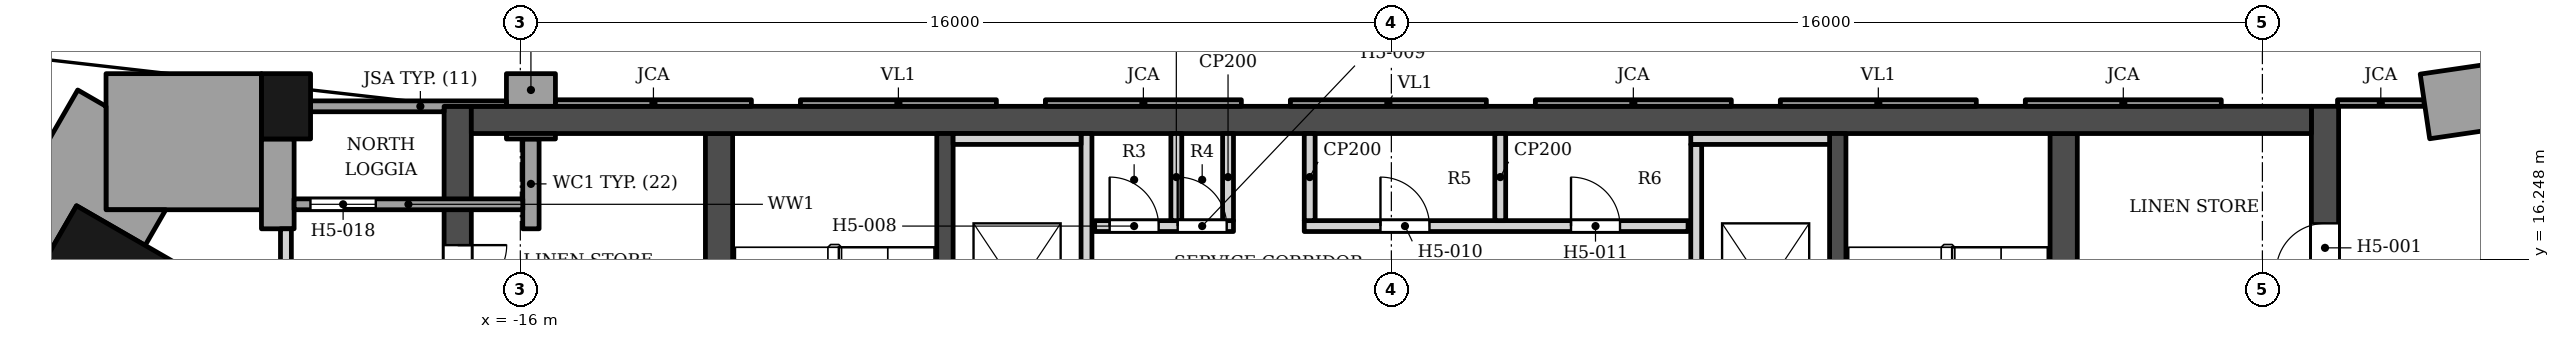
"""IFC4 building model, lengths in metres.
Left out: names, types, materials, properties, quantities, classifications, styles, units other than length and angle.
Written with IfcOpenShell. Run it as: python <this file> out.ifc"""

import sys

from ifc_helpers import new_model, si_unit, direction, frame, frame_2d, origin, origin_2d, place, context, subcontext, project, spatial, polyline, rectangle, outline, extrude, element, fill, save


model = new_model("IFC4")
c1 = context("Model", 3, precision=1e-05, world=origin(), true_north=direction((0.0, 1.0)))
c2 = subcontext(c1, "Body", "Model", "MODEL_VIEW")
j1 = project(units=[si_unit("LENGTHUNIT", "METRE"), si_unit("PLANEANGLEUNIT", "RADIAN")], contexts=[c1])
p1 = place(None, origin())
s1 = spatial("IfcSite", under=j1, at=p1, CompositionType="ELEMENT")
p2 = place(p1, origin())
s2 = spatial("IfcBuilding", under=s1, at=p2, CompositionType="ELEMENT")
p3 = place(p2, frame((0.0, 0.0, 91.8)))
s3 = spatial("IfcBuildingStorey", under=s2, at=p3, CompositionType="ELEMENT", Elevation=91.8)
p4 = place(p3, frame((-16.9, 18.802, 0.0), z_axis=(0.0, 0.0, 1.0), x_axis=(1.0, 0.0, 0.0)))
e1 = element("IfcWall", 1, at=p4, inside=s3, PredefinedType="SHEAR", context=c2, shape_type="SweptSolid", body=[
    extrude(rectangle(XDim=33.8, YDim=0.5, at=frame_2d((16.9, 0.0))), origin(), (0.0, 0.0, 1.0), 3.4),
])
p5 = place(p3, frame((-12.35, 5.253, 0.0), z_axis=(0.0, 0.0, 1.0), x_axis=(0.0, 1.0, 0.0)))
e2 = element("IfcWall", 2, at=p5, inside=s3, PredefinedType="SHEAR", context=c2, shape_type="SweptSolid", body=[
    extrude(rectangle(XDim=13.3, YDim=0.5, at=frame_2d((6.65, 0.0))), origin(), (0.0, 0.0, 1.0), 3.4),
])
p6 = place(p3, frame((-8.2, 5.253, 0.0), z_axis=(0.0, 0.0, 1.0), x_axis=(0.0, 1.0, 0.0)))
e3 = element("IfcWall", 3, at=p6, inside=s3, PredefinedType="SHEAR", context=c2, shape_type="SweptSolid", body=[
    extrude(rectangle(XDim=13.3, YDim=0.3, at=frame_2d((6.65, 0.0))), origin(), (0.0, 0.0, 1.0), 3.4),
])
p7 = place(p6, frame((7.1, 0.0, 0.0)))
e4 = element("IfcOpeningElement", 4, at=p7, cuts=e3, PredefinedType="OPENING", context=c2, shape_type="SweptSolid", body=[
    extrude(rectangle(XDim=1.4, YDim=2.1, at=frame_2d((0.7, 1.05))), frame((0.0, 0.16, 0.0), z_axis=(0.0, -1.0, 0.0), x_axis=(1.0, 0.0, 0.0)), (0.0, 0.0, 1.0), 0.32),
])
p8 = place(p6, frame((5.05, 0.0, 0.0)))
e5 = element("IfcOpeningElement", 5, at=p8, cuts=e3, PredefinedType="OPENING", context=c2, shape_type="SweptSolid", body=[
    extrude(rectangle(XDim=1.4, YDim=2.1, at=frame_2d((0.7, 1.05))), frame((0.0, 0.16, 0.0), z_axis=(0.0, -1.0, 0.0), x_axis=(1.0, 0.0, 0.0)), (0.0, 0.0, 1.0), 0.32),
])
p9 = place(p3, frame((12.35, 5.253, 0.0), z_axis=(0.0, 0.0, 1.0), x_axis=(0.0, 1.0, 0.0)))
e6 = element("IfcWall", 6, at=p9, inside=s3, PredefinedType="SHEAR", context=c2, shape_type="SweptSolid", body=[
    extrude(rectangle(XDim=13.3, YDim=0.5, at=frame_2d((6.65, 0.0))), origin(), (0.0, 0.0, 1.0), 3.4),
])
p10 = place(p3, frame((8.2, 5.253, 0.0), z_axis=(0.0, 0.0, 1.0), x_axis=(0.0, 1.0, 0.0)))
e7 = element("IfcWall", 7, at=p10, inside=s3, PredefinedType="SHEAR", context=c2, shape_type="SweptSolid", body=[
    extrude(rectangle(XDim=13.3, YDim=0.3, at=frame_2d((6.65, 0.0))), origin(), (0.0, 0.0, 1.0), 3.4),
])
p11 = place(p10, frame((7.1, 0.0, 0.0)))
e8 = element("IfcOpeningElement", 8, at=p11, cuts=e7, PredefinedType="OPENING", context=c2, shape_type="SweptSolid", body=[
    extrude(rectangle(XDim=1.4, YDim=2.1, at=frame_2d((0.7, 1.05))), frame((0.0, 0.16, 0.0), z_axis=(0.0, -1.0, 0.0), x_axis=(1.0, 0.0, 0.0)), (0.0, 0.0, 1.0), 0.32),
])
p12 = place(p10, frame((5.05, 0.0, 0.0)))
e9 = element("IfcOpeningElement", 9, at=p12, cuts=e7, PredefinedType="OPENING", context=c2, shape_type="SweptSolid", body=[
    extrude(rectangle(XDim=1.4, YDim=2.1, at=frame_2d((0.7, 1.05))), frame((0.0, 0.16, 0.0), z_axis=(0.0, -1.0, 0.0), x_axis=(1.0, 0.0, 0.0)), (0.0, 0.0, 1.0), 0.32),
])
p13 = place(p3, frame((-17.15, 5.853, 0.0), z_axis=(0.0, 0.0, 1.0), x_axis=(0.0, 1.0, 0.0)))
e10 = element("IfcWall", 10, at=p13, inside=s3, PredefinedType="SHEAR", context=c2, shape_type="SweptSolid", body=[
    extrude(rectangle(XDim=13.2, YDim=0.5, at=frame_2d((6.6, 0.0))), origin(), (0.0, 0.0, 1.0), 3.4),
])
p14 = place(p13, frame((4.1, 0.0, 0.0)))
e11 = element("IfcOpeningElement", 11, at=p14, cuts=e10, PredefinedType="OPENING", context=c2, shape_type="SweptSolid", body=[
    extrude(rectangle(XDim=1.6, YDim=2.1, at=frame_2d((0.8, 1.05))), frame((0.0, 0.26, 0.0), z_axis=(0.0, -1.0, 0.0), x_axis=(1.0, 0.0, 0.0)), (0.0, 0.0, 1.0), 0.52),
])
p15 = place(p13, frame((9.75, 0.0, 0.0)))
e12 = element("IfcOpeningElement", 12, at=p15, cuts=e10, PredefinedType="OPENING", context=c2, shape_type="SweptSolid", body=[
    extrude(rectangle(XDim=0.9, YDim=2.1, at=frame_2d((0.45, 1.05))), frame((0.0, 0.26, 0.0), z_axis=(0.0, -1.0, 0.0), x_axis=(1.0, 0.0, 0.0)), (0.0, 0.0, 1.0), 0.52),
])
p16 = place(p3, frame((17.15, 5.853, 0.0), z_axis=(0.0, 0.0, 1.0), x_axis=(0.0, 1.0, 0.0)))
e13 = element("IfcWall", 13, at=p16, inside=s3, PredefinedType="SHEAR", context=c2, shape_type="SweptSolid", body=[
    extrude(rectangle(XDim=13.2, YDim=0.5, at=frame_2d((6.6, 0.0))), origin(), (0.0, 0.0, 1.0), 3.4),
])
p17 = place(p16, frame((4.1, 0.0, 0.0)))
e14 = element("IfcOpeningElement", 14, at=p17, cuts=e13, PredefinedType="OPENING", context=c2, shape_type="SweptSolid", body=[
    extrude(rectangle(XDim=1.6, YDim=2.1, at=frame_2d((0.8, 1.05))), frame((0.0, 0.26, 0.0), z_axis=(0.0, -1.0, 0.0), x_axis=(1.0, 0.0, 0.0)), (0.0, 0.0, 1.0), 0.52),
])
p18 = place(p16, frame((10.15, 0.0, 0.0)))
e15 = element("IfcOpeningElement", 15, at=p18, cuts=e13, PredefinedType="OPENING", context=c2, shape_type="SweptSolid", body=[
    extrude(rectangle(XDim=0.9, YDim=2.1, at=frame_2d((0.45, 1.05))), frame((0.0, 0.26, 0.0), z_axis=(0.0, -1.0, 0.0), x_axis=(1.0, 0.0, 0.0)), (0.0, 0.0, 1.0), 0.52),
])
p19 = place(p3, frame((-23.603, 15.177, 0.0), z_axis=(0.0, 0.0, 1.0), x_axis=(0.866025438691, -0.49999993954, 0.0)))
e16 = element("IfcColumn", 16, at=p19, inside=s3, PredefinedType="COLUMN", context=c2, shape_type="SweptSolid", body=[
    extrude(rectangle(XDim=3.0, YDim=3.0, at=origin_2d()), origin(), (0.0, 0.0, 1.0), 3.4),
])
p20 = place(p3, frame((-20.303, 19.053, 0.0), z_axis=(0.0, 0.0, 1.0), x_axis=(-1.0, 0.0, 0.0)))
e17 = element("IfcColumn", 17, at=p20, inside=s3, PredefinedType="COLUMN", context=c2, shape_type="SweptSolid", body=[
    extrude(rectangle(XDim=0.9, YDim=1.2, at=origin_2d()), origin(), (0.0, 0.0, 1.0), 3.4),
])
p21 = place(p3, origin())
e18 = element("IfcWall", 18, at=p21, inside=s3, PredefinedType="SOLIDWALL", context=c2, shape_type="SweptSolid", body=[
    extrude(outline(polyline([(-15.355, 19.052), (-15.355, 19.653), (-16.255, 19.653), (-16.255, 19.052), (-15.355, 19.052)])), origin(), (0.0, 0.0, 1.0), 2.65),
])
p22 = place(p3, origin())
e19 = element("IfcWall", 19, at=p22, inside=s3, PredefinedType="SOLIDWALL", context=c2, shape_type="SweptSolid", body=[
    extrude(outline(polyline([(-15.355, 18.453), (-15.355, 18.552), (-16.255, 18.552), (-16.255, 18.453), (-15.355, 18.453)])), origin(), (0.0, 0.0, 1.0), 2.65),
])
p23 = place(p3, origin())
e20 = element("IfcWall", 20, at=p23, inside=s3, PredefinedType="SOLIDWALL", context=c2, shape_type="SweptSolid", body=[
    extrude(outline(polyline([(-15.655, 16.802), (-15.655, 18.453), (-15.955, 18.453), (-15.955, 16.802), (-15.655, 16.802)])), origin(), (0.0, 0.0, 1.0), 2.65),
])
p24 = place(p3, origin())
e21 = element("IfcWall", 21, at=p24, inside=s3, PredefinedType="SOLIDWALL", context=c2, shape_type="SweptSolid", body=[
    extrude(outline(polyline([(-20.755, 18.453), (-20.755, 16.802), (-20.155, 16.802), (-20.155, 18.453), (-20.755, 18.453)])), origin(), (0.0, 0.0, 1.0), 2.63),
])
p25 = place(p3, origin())
e22 = element("IfcWall", 22, at=p25, inside=s3, PredefinedType="SOLIDWALL", context=c2, shape_type="SweptSolid", body=[
    extrude(outline(polyline([(11.645, 19.173), (11.645, 19.052), (15.245, 19.052), (15.245, 19.173), (11.645, 19.173)])), origin(), (0.0, 0.0, 1.0), 2.65),
])
p26 = place(p3, origin())
e23 = element("IfcWall", 23, at=p26, inside=s3, PredefinedType="ELEMENTEDWALL", context=c2, shape_type="SweptSolid", body=[
    extrude(outline(polyline([(7.145, 19.173), (7.145, 19.052), (10.745, 19.052), (10.745, 19.173), (7.145, 19.173)])), origin(), (0.0, 0.0, 1.0), 2.65),
])
p27 = place(p3, origin())
e24 = element("IfcWall", 24, at=p27, inside=s3, PredefinedType="SOLIDWALL", context=c2, shape_type="SweptSolid", body=[
    extrude(outline(polyline([(2.645, 19.173), (2.645, 19.052), (6.245, 19.052), (6.245, 19.173), (2.645, 19.173)])), origin(), (0.0, 0.0, 1.0), 2.65),
])
p28 = place(p3, origin())
e25 = element("IfcWall", 25, at=p28, inside=s3, PredefinedType="ELEMENTEDWALL", context=c2, shape_type="SweptSolid", body=[
    extrude(outline(polyline([(-1.855, 19.173), (-1.855, 19.052), (1.745, 19.052), (1.745, 19.173), (-1.855, 19.173)])), origin(), (0.0, 0.0, 1.0), 2.65),
])
p29 = place(p3, origin())
e26 = element("IfcWall", 26, at=p29, inside=s3, PredefinedType="SOLIDWALL", context=c2, shape_type="SweptSolid", body=[
    extrude(outline(polyline([(-6.355, 19.173), (-6.355, 19.052), (-2.755, 19.052), (-2.755, 19.173), (-6.355, 19.173)])), origin(), (0.0, 0.0, 1.0), 2.65),
])
p30 = place(p3, origin())
e27 = element("IfcWall", 27, at=p30, inside=s3, PredefinedType="ELEMENTEDWALL", context=c2, shape_type="SweptSolid", body=[
    extrude(outline(polyline([(-10.855, 19.173), (-10.855, 19.052), (-7.255, 19.052), (-7.255, 19.173), (-10.855, 19.173)])), origin(), (0.0, 0.0, 1.0), 2.65),
])
p31 = place(p3, origin())
e28 = element("IfcWall", 28, at=p31, inside=s3, PredefinedType="SOLIDWALL", context=c2, shape_type="SweptSolid", body=[
    extrude(outline(polyline([(-15.354, 19.173), (-15.354, 19.052), (-11.755, 19.052), (-11.755, 19.173), (-15.354, 19.173)])), origin(), (0.0, 0.0, 1.0), 2.65),
])
p32 = place(p3, origin())
e29 = element("IfcWall", 29, at=p32, inside=s3, PredefinedType="SOLIDWALL", context=c2, shape_type="SweptSolid", body=[
    extrude(outline(polyline([(-16.255, 19.052), (-16.255, 19.153), (-19.853, 19.153), (-19.853, 18.953), (-17.4, 18.953), (-17.4, 19.052), (-16.255, 19.052)])), origin(), (0.0, 0.0, 1.0), 2.65),
])
p33 = place(p3, frame((-15.955, 17.252, 0.0), z_axis=(0.0, 0.0, 1.0), x_axis=(-1.0, 0.0, 0.0)))
e30 = element("IfcWall", 30, at=p33, inside=s3, PredefinedType="ELEMENTEDWALL", context=c2, shape_type="SweptSolid", body=[
    extrude(rectangle(XDim=4.2, YDim=0.2, at=frame_2d((2.1, 0.0))), origin(), (0.0, 0.0, 1.0), 2.65),
])
p34 = place(p33, frame((2.7, 0.0, 0.0)))
e31 = element("IfcOpeningElement", 31, at=p34, cuts=e30, PredefinedType="OPENING", context=c2, shape_type="SweptSolid", body=[
    extrude(rectangle(XDim=1.2, YDim=2.4, at=frame_2d((0.6, 1.2))), frame((0.0, 0.11, 0.0), z_axis=(0.0, -1.0, 0.0), x_axis=(1.0, 0.0, 0.0)), (0.0, 0.0, 1.0), 0.22),
])
p35 = place(p3, origin())
e32 = element("IfcWall", 32, at=p35, inside=s3, PredefinedType="SOLIDWALL", context=c2, shape_type="SweptSolid", body=[
    extrude(outline(polyline([(-23.61, 17.153), (-20.755, 17.153), (-20.755, 19.653), (-23.61, 19.653), (-23.61, 17.153)])), origin(), (0.0, 0.0, 1.0), 2.63),
])
p36 = place(p3, origin())
e33 = element("IfcWall", 33, at=p36, inside=s3, PredefinedType="SOLIDWALL", context=c2, shape_type="SweptSolid", body=[
    extrude(outline(polyline([(-22.891, 16.498), (-22.513, 17.153), (-23.61, 17.153), (-23.61, 19.052), (-24.13, 19.353), (-27.485, 13.541), (-25.32, 12.291), (-24.391, 13.9), (-25.652, 14.628), (-24.152, 17.226), (-22.891, 16.498)])), origin(), (0.0, 0.0, 1.0), 2.63),
])
p37 = place(p3, frame((18.986, 19.051, 0.0), z_axis=(0.0, 0.0, 1.0), x_axis=(0.989435994601, 0.144970385211, 0.0)))
e34 = element("IfcWall", 34, at=p37, inside=s3, PredefinedType="SOLIDWALL", context=c2, shape_type="SweptSolid", body=[
    extrude(rectangle(XDim=1.396, YDim=1.2, at=frame_2d((0.698, 0.0))), origin(), (0.0, 0.0, 1.0), 2.65),
])
p38 = place(p3, frame((17.38, 19.113, 0.0), z_axis=(0.0, 0.0, 1.0), x_axis=(1.0, 0.0, 0.0)))
e35 = element("IfcWall", 35, at=p38, inside=s3, PredefinedType="SOLIDWALL", context=c2, shape_type="SweptSolid", body=[
    extrude(rectangle(XDim=1.59, YDim=0.12, at=frame_2d((0.795, 0.0))), origin(), (0.0, 0.0, 1.0), 2.65),
])
p39 = place(p3, frame((-5.6, 14.253, 0.0), z_axis=(0.0, 0.0, 1.0), x_axis=(0.0, 1.0, 0.0)))
e36 = element("IfcWall", 36, at=p39, inside=s3, PredefinedType="SOLIDWALL", context=c2, shape_type="SweptSolid", body=[
    extrude(rectangle(XDim=4.3, YDim=0.2, at=frame_2d((2.15, 0.0))), origin(), (0.0, 0.0, 1.0), 3.23),
])
p40 = place(p3, frame((5.6, 15.453, 0.0), z_axis=(0.0, 0.0, 1.0), x_axis=(0.0, 1.0, 0.0)))
e37 = element("IfcWall", 37, at=p40, inside=s3, PredefinedType="SOLIDWALL", context=c2, shape_type="SweptSolid", body=[
    extrude(rectangle(XDim=2.9, YDim=0.2, at=frame_2d((1.45, 0.0))), origin(), (0.0, 0.0, 1.0), 3.23),
])
p41 = place(p3, frame((-5.45, 16.853, 0.0), z_axis=(0.0, 0.0, 1.0), x_axis=(1.0, 0.0, 0.0)))
e38 = element("IfcWall", 38, at=p41, inside=s3, PredefinedType="SOLIDWALL", context=c2, shape_type="SweptSolid", body=[
    extrude(rectangle(XDim=2.55, YDim=0.2, at=frame_2d((1.275, 0.0))), origin(), (0.0, 0.0, 1.0), 3.23),
])
p42 = place(p41, frame((0.275, 0.0, 0.0)))
e39 = element("IfcOpeningElement", 39, at=p42, cuts=e38, PredefinedType="OPENING", context=c2, shape_type="SweptSolid", body=[
    extrude(rectangle(XDim=0.9, YDim=2.1, at=frame_2d((0.45, 1.05))), frame((0.0, 0.11, 0.0), z_axis=(0.0, -1.0, 0.0), x_axis=(1.0, 0.0, 0.0)), (0.0, 0.0, 1.0), 0.22),
])
p43 = place(p41, frame((1.525, 0.0, 0.0)))
e40 = element("IfcOpeningElement", 40, at=p43, cuts=e38, PredefinedType="OPENING", context=c2, shape_type="SweptSolid", body=[
    extrude(rectangle(XDim=0.9, YDim=2.1, at=frame_2d((0.45, 1.05))), frame((0.0, 0.11, 0.0), z_axis=(0.0, -1.0, 0.0), x_axis=(1.0, 0.0, 0.0)), (0.0, 0.0, 1.0), 0.22),
])
p44 = place(p3, frame((-1.6, 16.853, 0.0), z_axis=(0.0, 0.0, 1.0), x_axis=(1.0, 0.0, 0.0)))
e41 = element("IfcWall", 41, at=p44, inside=s3, PredefinedType="SOLIDWALL", context=c2, shape_type="SweptSolid", body=[
    extrude(rectangle(XDim=7.05, YDim=0.2, at=frame_2d((3.525, 0.0))), origin(), (0.0, 0.0, 1.0), 3.23),
])
p45 = place(p44, frame((1.4, 0.0, 0.0)))
e42 = element("IfcOpeningElement", 42, at=p45, cuts=e41, PredefinedType="OPENING", context=c2, shape_type="SweptSolid", body=[
    extrude(rectangle(XDim=0.9, YDim=2.1, at=frame_2d((0.45, 1.05))), frame((0.0, 0.11, 0.0), z_axis=(0.0, -1.0, 0.0), x_axis=(1.0, 0.0, 0.0)), (0.0, 0.0, 1.0), 0.22),
])
p46 = place(p44, frame((4.9, 0.0, 0.0)))
e43 = element("IfcOpeningElement", 43, at=p46, cuts=e41, PredefinedType="OPENING", context=c2, shape_type="SweptSolid", body=[
    extrude(rectangle(XDim=0.9, YDim=2.1, at=frame_2d((0.45, 1.05))), frame((0.0, 0.11, 0.0), z_axis=(0.0, -1.0, 0.0), x_axis=(1.0, 0.0, 0.0)), (0.0, 0.0, 1.0), 0.22),
])
for number, where, z_axis, x_axis in (
    (44, (-3.95, 16.953, 0.0), (0.0, 0.0, 1.0), (0.0, 1.0, 0.0)),
    (45, (-3.0, 16.953, 0.0), (0.0, 0.0, 1.0), (0.0, 1.0, 0.0)),
    (46, (-1.5, 16.953, 0.0), (0.0, 0.0, 1.0), (0.0, 1.0, 0.0)),
    (47, (2.0, 16.953, 0.0), (0.0, 0.0, 1.0), (0.0, 1.0, 0.0)),
):
    element("IfcWall", number, at=place(p3, frame(where, z_axis=z_axis, x_axis=x_axis)), inside=s3, PredefinedType="PARTITIONING", context=c2, shape_type="SweptSolid", body=[
        extrude(rectangle(XDim=1.6, YDim=0.2, at=frame_2d((0.8, 0.0))), origin(), (0.0, 0.0, 1.0), 3.23),
    ])
p47 = place(p3, frame((-8.05, 18.453, 0.0), z_axis=(0.0, 0.0, 1.0), x_axis=(1.0, 0.0, 0.0)))
e48 = element("IfcWall", 48, at=p47, inside=s3, PredefinedType="SOLIDWALL", context=c2, shape_type="SweptSolid", body=[
    extrude(rectangle(XDim=2.35, YDim=0.2, at=frame_2d((1.175, 0.0))), origin(), (0.0, 0.0, 1.0), 3.23),
])
p48 = place(p3, frame((5.5, 18.453, 0.0), z_axis=(0.0, 0.0, 1.0), x_axis=(1.0, 0.0, 0.0)))
e49 = element("IfcWall", 49, at=p48, inside=s3, PredefinedType="SOLIDWALL", context=c2, shape_type="SweptSolid", body=[
    extrude(rectangle(XDim=2.55, YDim=0.2, at=frame_2d((1.275, 0.0))), origin(), (0.0, 0.0, 1.0), 3.23),
])
p49 = place(p3, frame((-20.306, 16.802, 0.0), z_axis=(0.0, 0.0, 1.0), x_axis=(0.0, -1.0, 0.0)))
e50 = element("IfcWall", 50, at=p49, inside=s3, PredefinedType="PARTITIONING", context=c2, shape_type="SweptSolid", body=[
    extrude(rectangle(XDim=1.55, YDim=0.2, at=frame_2d((0.775, 0.0))), origin(), (0.0, 0.0, 1.0), 3.23),
])
p50 = place(p34, origin())
e51 = element("IfcDoor", 51, at=p50, inside=s3, OperationType="SINGLE_SWING_LEFT", PredefinedType="DOOR", context=c2, shape_type="SweptSolid", body=[
    extrude(rectangle(XDim=1.2, YDim=2.4, at=frame_2d((0.6, 1.2))), frame((0.0, 0.025, 0.0), z_axis=(0.0, -1.0, 0.0), x_axis=(1.0, 0.0, 0.0)), (0.0, 0.0, 1.0), 0.05),
])
fill(e31, e51)
p51 = place(p42, origin())
e52 = element("IfcDoor", 52, at=p51, inside=s3, OperationType="SINGLE_SWING_LEFT", PredefinedType="DOOR", context=c2, shape_type="SweptSolid", body=[
    extrude(rectangle(XDim=0.9, YDim=2.1, at=frame_2d((0.45, 1.05))), frame((0.0, 0.025, 0.0), z_axis=(0.0, -1.0, 0.0), x_axis=(1.0, 0.0, 0.0)), (0.0, 0.0, 1.0), 0.05),
])
fill(e39, e52)
p52 = place(p43, origin())
e53 = element("IfcDoor", 53, at=p52, inside=s3, OperationType="SINGLE_SWING_LEFT", PredefinedType="DOOR", context=c2, shape_type="SweptSolid", body=[
    extrude(rectangle(XDim=0.9, YDim=2.1, at=frame_2d((0.45, 1.05))), frame((0.0, 0.025, 0.0), z_axis=(0.0, -1.0, 0.0), x_axis=(1.0, 0.0, 0.0)), (0.0, 0.0, 1.0), 0.05),
])
fill(e40, e53)
p53 = place(p45, origin())
e54 = element("IfcDoor", 54, at=p53, inside=s3, OperationType="SINGLE_SWING_LEFT", PredefinedType="DOOR", context=c2, shape_type="SweptSolid", body=[
    extrude(rectangle(XDim=0.9, YDim=2.1, at=frame_2d((0.45, 1.05))), frame((0.0, 0.025, 0.0), z_axis=(0.0, -1.0, 0.0), x_axis=(1.0, 0.0, 0.0)), (0.0, 0.0, 1.0), 0.05),
])
fill(e42, e54)
p54 = place(p46, origin())
e55 = element("IfcDoor", 55, at=p54, inside=s3, OperationType="SINGLE_SWING_LEFT", PredefinedType="DOOR", context=c2, shape_type="SweptSolid", body=[
    extrude(rectangle(XDim=0.9, YDim=2.1, at=frame_2d((0.45, 1.05))), frame((0.0, 0.025, 0.0), z_axis=(0.0, -1.0, 0.0), x_axis=(1.0, 0.0, 0.0)), (0.0, 0.0, 1.0), 0.05),
])
fill(e43, e55)
p55 = place(p15, origin())
e56 = element("IfcDoor", 56, at=p55, inside=s3, OperationType="SINGLE_SWING_RIGHT", PredefinedType="DOOR", context=c2, shape_type="SweptSolid", body=[
    extrude(rectangle(XDim=0.9, YDim=2.1, at=frame_2d((0.45, 1.05))), frame((0.0, 0.025, 0.0), z_axis=(0.0, -1.0, 0.0), x_axis=(1.0, 0.0, 0.0)), (0.0, 0.0, 1.0), 0.05),
])
fill(e12, e56)
p56 = place(p18, origin())
e57 = element("IfcDoor", 57, at=p56, inside=s3, OperationType="SINGLE_SWING_LEFT", PredefinedType="DOOR", context=c2, shape_type="SweptSolid", body=[
    extrude(rectangle(XDim=0.9, YDim=2.1, at=frame_2d((0.45, 1.05))), frame((0.0, 0.025, 0.0), z_axis=(0.0, -1.0, 0.0), x_axis=(1.0, 0.0, 0.0)), (0.0, 0.0, 1.0), 0.05),
])
fill(e15, e57)
save(model, sys.argv[1])
